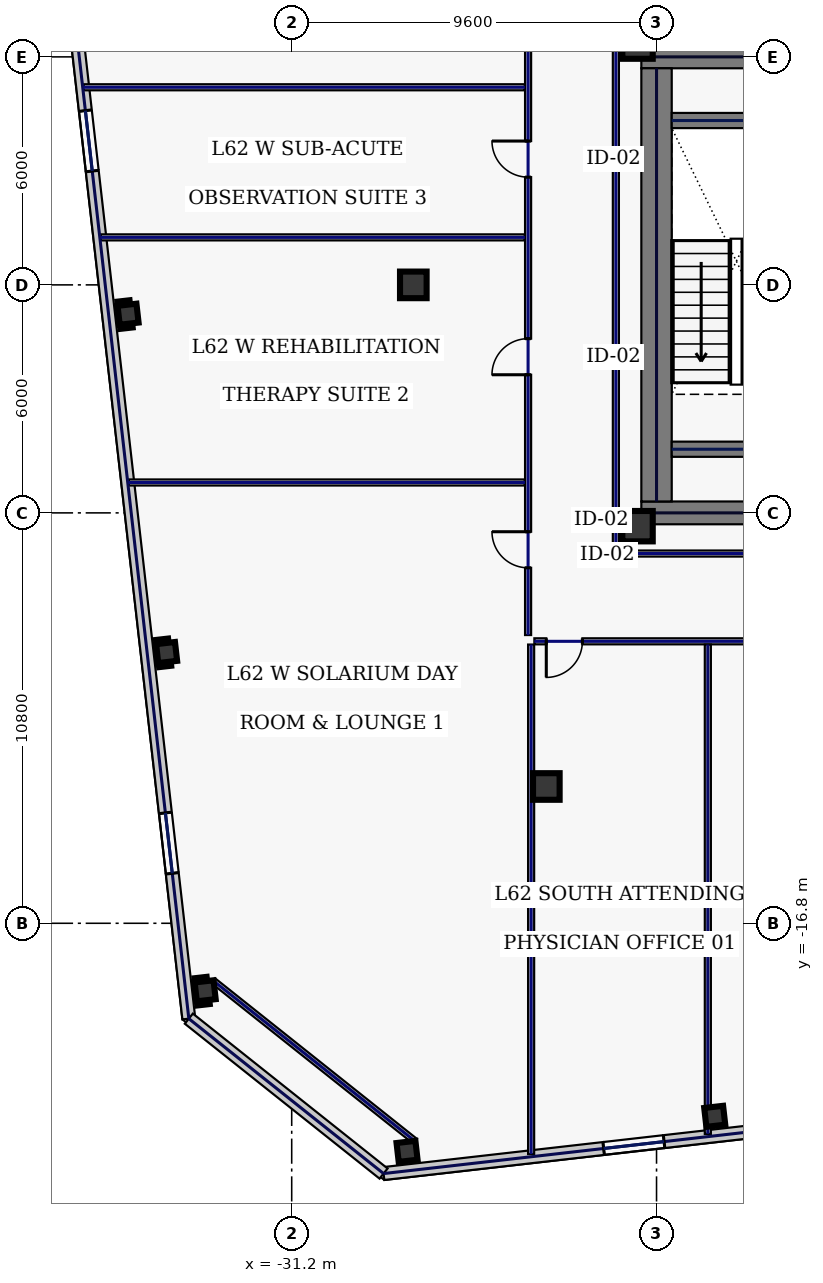
"""IFC4 building model, lengths in metres.
Left out: names, types, materials, properties, quantities, classifications, styles, units other than length and angle.
Written with IfcOpenShell. Run it as: python <this file> out.ifc"""

import sys

from ifc_helpers import new_model, si_unit, direction, frame, frame_2d, origin, origin_2d, place, context, subcontext, project, spatial, rectangle, hollow_rectangle, extrude, element, fill, save


model = new_model("IFC4")
c1 = context("Model", 3, precision=1e-05, world=origin(), true_north=direction((0.0, 1.0)))
c2 = subcontext(c1, "Body", "Model", "MODEL_VIEW")
j1 = project(units=[si_unit("LENGTHUNIT", "METRE"), si_unit("PLANEANGLEUNIT", "RADIAN")], contexts=[c1])
p1 = place(None, origin())
s1 = spatial("IfcSite", under=j1, at=p1, CompositionType="ELEMENT")
p2 = place(p1, origin())
s2 = spatial("IfcBuilding", under=s1, at=p2, CompositionType="ELEMENT")
p3 = place(p2, frame((0.0, 0.0, 267.0)))
s3 = spatial("IfcBuildingStorey", under=s2, at=p3, CompositionType="ELEMENT", Elevation=267.0)
for number, where, z_axis, x_axis in (
    (1, (-22.0, 6.0, 0.0), (0.0, 0.0, 1.0), (1.0, 0.0, 0.0)),
    (2, (-22.0, -6.0, 0.0), (0.0, 0.0, 1.0), (1.0, 0.0, 0.0)),
):
    element("IfcWall", number, at=place(p3, frame(where, z_axis=z_axis, x_axis=x_axis)), inside=s3, PredefinedType="SHEAR", context=c2, shape_type="SweptSolid", body=[
        extrude(rectangle(XDim=11.5, YDim=0.6, at=frame_2d((5.75, 0.0))), origin(), (0.0, 0.0, 1.0), 3.68),
    ])
p4 = place(p3, frame((-21.6, -5.7, 0.0), z_axis=(0.0, 0.0, 1.0), x_axis=(0.0, 1.0, 0.0)))
e3 = element("IfcWall", 3, at=p4, inside=s3, PredefinedType="SHEAR", context=c2, shape_type="SweptSolid", body=[
    extrude(rectangle(XDim=11.4, YDim=0.8, at=frame_2d((5.7, 0.0))), origin(), (0.0, 0.0, 1.0), 3.68),
])
for number, where, z_axis, x_axis in (
    (4, (-21.2, -4.325, 0.0), (0.0, 0.0, 1.0), (1.0, 0.0, 0.0)),
    (5, (-21.2, 4.325, 0.0), (0.0, 0.0, 1.0), (1.0, 0.0, 0.0)),
):
    element("IfcWall", number, at=place(p3, frame(where, z_axis=z_axis, x_axis=x_axis)), inside=s3, PredefinedType="SHEAR", context=c2, shape_type="SweptSolid", body=[
        extrude(rectangle(XDim=3.4, YDim=0.4, at=frame_2d((1.7, 0.0))), origin(), (0.0, 0.0, 1.0), 3.68),
    ])
for number, where, z_axis, x_axis in (
    (6, (-22.1, -6.35, 0.0), (0.0, 0.0, 1.0), (1.0, 0.0, 0.0)),
    (7, (-22.1, 6.35, 0.0), (0.0, 0.0, 1.0), (1.0, 0.0, 0.0)),
):
    element("IfcColumn", number, at=place(p3, frame(where, z_axis=z_axis, x_axis=x_axis)), inside=s3, PredefinedType="COLUMN", context=c2, shape_type="SweptSolid", body=[
        extrude(hollow_rectangle(XDim=0.8, YDim=0.8, WallThickness=0.036, at=origin_2d()), origin(), (0.0, 0.0, 1.0), 3.68),
    ])
for number, where, z_axis, x_axis in (
    (8, (-24.5, -13.2, 0.0), (0.0, 0.0, 1.0), (1.0, 0.0, 0.0)),
    (9, (-28.0, 0.0, 0.0), (0.0, 0.0, 1.0), (1.0, 0.0, 0.0)),
):
    element("IfcColumn", number, at=place(p3, frame(where, z_axis=z_axis, x_axis=x_axis)), inside=s3, PredefinedType="COLUMN", context=c2, shape_type="SweptSolid", body=[
        extrude(hollow_rectangle(XDim=0.7, YDim=0.7, WallThickness=0.032, at=origin_2d()), origin(), (0.0, 0.0, 1.0), 3.68),
    ])
for number, where, z_axis, x_axis in (
    (10, (-28.165, -22.802, 0.0), (0.0, 0.0, 1.0), (0.994, 0.113, 0.0)),
    (11, (-20.069, -21.88, 0.0), (0.0, 0.0, 1.0), (0.994, 0.113, 0.0)),
    (12, (-35.506, -0.772, 0.0), (0.0, 0.0, 1.0), (0.994, 0.113, 0.0)),
    (13, (-34.491, -9.674, 0.0), (0.0, 0.0, 1.0), (0.994, 0.113, 0.0)),
    (14, (-33.477, -18.577, 0.0), (0.0, 0.0, 1.0), (0.994, 0.113, 0.0)),
):
    element("IfcColumn", number, at=place(p3, frame(where, z_axis=z_axis, x_axis=x_axis)), inside=s3, PredefinedType="COLUMN", context=c2, shape_type="SweptSolid", body=[
        extrude(hollow_rectangle(XDim=0.5, YDim=0.5, WallThickness=0.025, at=origin_2d()), origin(), (0.0, 0.0, 1.0), 3.68),
    ])
p5 = place(p3, frame((-28.783, -23.386, 0.0), z_axis=(0.0, 0.0, 1.0), x_axis=(0.993572271362, 0.113199565282, 0.0)))
e15 = element("IfcWall", 15, at=p5, inside=s3, PredefinedType="STANDARD", context=c2, shape_type="SweptSolid", body=[
    extrude(rectangle(XDim=18.651, YDim=0.34, at=frame_2d((9.326, 0.0))), origin(), (0.0, 0.0, 1.0), 3.68),
])
p6 = place(p5, frame((5.829, 0.0, 0.22)))
e16 = element("IfcOpeningElement", 16, at=p6, cuts=e15, PredefinedType="OPENING", context=c2, shape_type="SweptSolid", body=[
    extrude(rectangle(XDim=1.6, YDim=1.2, at=frame_2d((0.8, 0.6))), frame((0.0, 0.18, 0.0), z_axis=(0.0, -1.0, 0.0), x_axis=(1.0, 0.0, 0.0)), (0.0, 0.0, 1.0), 0.36),
])
p7 = place(p5, frame((10.229, 0.0, 0.22)))
e17 = element("IfcOpeningElement", 17, at=p7, cuts=e15, PredefinedType="OPENING", context=c2, shape_type="SweptSolid", body=[
    extrude(rectangle(XDim=1.6, YDim=1.2, at=frame_2d((0.8, 0.6))), frame((0.0, 0.18, 0.0), z_axis=(0.0, -1.0, 0.0), x_axis=(1.0, 0.0, 0.0)), (0.0, 0.0, 1.0), 0.36),
])
p8 = place(p3, frame((-38.118, 17.651, 0.0), z_axis=(0.0, 0.0, 1.0), x_axis=(0.11320360501, -0.9935718111, 0.0)))
e18 = element("IfcWall", 18, at=p8, inside=s3, PredefinedType="STANDARD", context=c2, shape_type="SweptSolid", body=[
    extrude(rectangle(XDim=37.2, YDim=0.34, at=frame_2d((18.6, 0.0))), origin(), (0.0, 0.0, 1.0), 3.68),
])
p9 = place(p8, frame((3.85, 0.0, 0.22)))
e19 = element("IfcOpeningElement", 19, at=p9, cuts=e18, PredefinedType="OPENING", context=c2, shape_type="SweptSolid", body=[
    extrude(rectangle(XDim=1.6, YDim=1.2, at=frame_2d((0.8, 0.6))), frame((0.0, 0.18, 0.0), z_axis=(0.0, -1.0, 0.0), x_axis=(1.0, 0.0, 0.0)), (0.0, 0.0, 1.0), 0.36),
])
p10 = place(p8, frame((13.15, 0.0, 0.22)))
e20 = element("IfcOpeningElement", 20, at=p10, cuts=e18, PredefinedType="OPENING", context=c2, shape_type="SweptSolid", body=[
    extrude(rectangle(XDim=1.6, YDim=1.2, at=frame_2d((0.8, 0.6))), frame((0.0, 0.18, 0.0), z_axis=(0.0, -1.0, 0.0), x_axis=(1.0, 0.0, 0.0)), (0.0, 0.0, 1.0), 0.36),
])
p11 = place(p8, frame((31.75, 0.0, 0.22)))
e21 = element("IfcOpeningElement", 21, at=p11, cuts=e18, PredefinedType="OPENING", context=c2, shape_type="SweptSolid", body=[
    extrude(rectangle(XDim=1.6, YDim=1.2, at=frame_2d((0.8, 0.6))), frame((0.0, 0.18, 0.0), z_axis=(0.0, -1.0, 0.0), x_axis=(1.0, 0.0, 0.0)), (0.0, 0.0, 1.0), 0.36),
])
p12 = place(p3, frame((-33.907, -19.31, 0.0), z_axis=(0.0, 0.0, 1.0), x_axis=(0.782611787794, -0.622510071892, 0.0)))
e22 = element("IfcWall", 22, at=p12, inside=s3, PredefinedType="STANDARD", context=c2, shape_type="SweptSolid", body=[
    extrude(rectangle(XDim=6.548, YDim=0.34, at=frame_2d((3.274, 0.0))), origin(), (0.0, 0.0, 1.0), 3.68),
])
p13 = place(p3, frame((-33.265, -18.311, 0.0), z_axis=(0.0, 0.0, 1.0), x_axis=(0.782602647064, -0.622521563328, 0.0)))
e23 = element("IfcWall", 23, at=p13, inside=s3, PredefinedType="PARTITIONING", context=c2, shape_type="SweptSolid", body=[
    extrude(rectangle(XDim=6.788, YDim=0.16, at=frame_2d((3.394, 0.0))), origin(), (0.0, 0.0, 1.0), 1.475),
])
p14 = place(p3, frame((-24.98, -9.215, 0.0), z_axis=(0.0, 0.0, 1.0), x_axis=(0.0, 1.0, 0.0)))
e24 = element("IfcWall", 24, at=p14, inside=s3, PredefinedType="PARTITIONING", context=c2, shape_type="SweptSolid", body=[
    extrude(rectangle(XDim=18.63, YDim=0.16, at=frame_2d((9.315, 0.0))), origin(), (0.0, 0.0, 1.0), 3.68),
])
p15 = place(p14, frame((1.769, 0.0, 0.0)))
e25 = element("IfcOpeningElement", 25, at=p15, cuts=e24, PredefinedType="OPENING", context=c2, shape_type="SweptSolid", body=[
    extrude(rectangle(XDim=0.95, YDim=2.2, at=frame_2d((0.475, 1.1))), frame((0.0, 0.09, 0.0), z_axis=(0.0, -1.0, 0.0), x_axis=(1.0, 0.0, 0.0)), (0.0, 0.0, 1.0), 0.18),
])
p16 = place(p14, frame((6.85, 0.0, 0.0)))
e26 = element("IfcOpeningElement", 26, at=p16, cuts=e24, PredefinedType="OPENING", context=c2, shape_type="SweptSolid", body=[
    extrude(rectangle(XDim=0.95, YDim=2.2, at=frame_2d((0.475, 1.1))), frame((0.0, 0.09, 0.0), z_axis=(0.0, -1.0, 0.0), x_axis=(1.0, 0.0, 0.0)), (0.0, 0.0, 1.0), 0.18),
])
p17 = place(p14, frame((12.05, 0.0, 0.0)))
e27 = element("IfcOpeningElement", 27, at=p17, cuts=e24, PredefinedType="OPENING", context=c2, shape_type="SweptSolid", body=[
    extrude(rectangle(XDim=0.95, YDim=2.2, at=frame_2d((0.475, 1.1))), frame((0.0, 0.09, 0.0), z_axis=(0.0, -1.0, 0.0), x_axis=(1.0, 0.0, 0.0)), (0.0, 0.0, 1.0), 0.18),
])
p18 = place(p14, frame((16.821, 0.0, 0.0)))
e28 = element("IfcOpeningElement", 28, at=p18, cuts=e24, PredefinedType="OPENING", context=c2, shape_type="SweptSolid", body=[
    extrude(rectangle(XDim=0.95, YDim=2.2, at=frame_2d((0.475, 1.1))), frame((0.0, 0.09, 0.0), z_axis=(0.0, -1.0, 0.0), x_axis=(1.0, 0.0, 0.0)), (0.0, 0.0, 1.0), 0.18),
])
p19 = place(p3, frame((12.535, -9.38, 0.0), z_axis=(0.0, 0.0, 1.0), x_axis=(-1.0, 0.0, 0.0)))
e29 = element("IfcWall", 29, at=p19, inside=s3, PredefinedType="PARTITIONING", context=c2, shape_type="SweptSolid", body=[
    extrude(rectangle(XDim=37.35, YDim=0.16, at=frame_2d((18.675, 0.0))), origin(), (0.0, 0.0, 1.0), 3.68),
])
p20 = place(p19, frame((36.086, 0.0, 0.0)))
e30 = element("IfcOpeningElement", 30, at=p20, cuts=e29, PredefinedType="OPENING", context=c2, shape_type="SweptSolid", body=[
    extrude(rectangle(XDim=0.95, YDim=2.2, at=frame_2d((0.475, 1.1))), frame((0.0, 0.09, 0.0), z_axis=(0.0, -1.0, 0.0), x_axis=(1.0, 0.0, 0.0)), (0.0, 0.0, 1.0), 0.18),
])
p21 = place(p19, frame((29.195, 0.0, 0.0)))
e31 = element("IfcOpeningElement", 31, at=p21, cuts=e29, PredefinedType="OPENING", context=c2, shape_type="SweptSolid", body=[
    extrude(rectangle(XDim=1.3, YDim=2.2, at=frame_2d((0.65, 1.1))), frame((0.0, 0.09, 0.0), z_axis=(0.0, -1.0, 0.0), x_axis=(1.0, 0.0, 0.0)), (0.0, 0.0, 1.0), 0.18),
])
p22 = place(p19, frame((20.525, 0.0, 0.0)))
e32 = element("IfcOpeningElement", 32, at=p22, cuts=e29, PredefinedType="OPENING", context=c2, shape_type="SweptSolid", body=[
    extrude(rectangle(XDim=1.15, YDim=2.2, at=frame_2d((0.575, 1.1))), frame((0.0, 0.09, 0.0), z_axis=(0.0, -1.0, 0.0), x_axis=(1.0, 0.0, 0.0)), (0.0, 0.0, 1.0), 0.18),
])
p23 = place(p19, frame((8.945, 0.0, 0.0)))
e33 = element("IfcOpeningElement", 33, at=p23, cuts=e29, PredefinedType="OPENING", context=c2, shape_type="SweptSolid", body=[
    extrude(rectangle(XDim=1.05, YDim=2.2, at=frame_2d((0.525, 1.1))), frame((0.0, 0.09, 0.0), z_axis=(0.0, -1.0, 0.0), x_axis=(1.0, 0.0, 0.0)), (0.0, 0.0, 1.0), 0.18),
])
p24 = place(p3, frame((-22.67, 7.185, 0.0), z_axis=(0.0, 0.0, 1.0), x_axis=(0.0, -1.0, 0.0)))
e34 = element("IfcWall", 34, at=p24, inside=s3, PredefinedType="PARTITIONING", context=c2, shape_type="SweptSolid", body=[
    extrude(rectangle(XDim=14.17, YDim=0.16, at=frame_2d((7.085, 0.0))), origin(), (0.0, 0.0, 1.0), 3.68),
])
p25 = place(p3, frame((-22.585, -7.07, 0.0), z_axis=(0.0, 0.0, 1.0), x_axis=(1.0, 0.0, 0.0)))
e35 = element("IfcWall", 35, at=p25, inside=s3, PredefinedType="PARTITIONING", context=c2, shape_type="SweptSolid", body=[
    extrude(rectangle(XDim=11.87, YDim=0.16, at=frame_2d((5.935, 0.0))), origin(), (0.0, 0.0, 1.0), 3.68),
])
p26 = place(p3, frame((-24.9, -22.873, 0.0), z_axis=(0.0, 0.0, 1.0), x_axis=(0.0, 1.0, 0.0)))
e36 = element("IfcWall", 36, at=p26, inside=s3, PredefinedType="PARTITIONING", context=c2, shape_type="SweptSolid", body=[
    extrude(rectangle(XDim=13.408, YDim=0.16, at=frame_2d((6.704, 0.0))), origin(), (0.0, 0.0, 1.0), 3.68),
])
p27 = place(p3, frame((-20.25, -22.344, 0.0), z_axis=(0.0, 0.0, 1.0), x_axis=(0.0, 1.0, 0.0)))
e37 = element("IfcWall", 37, at=p27, inside=s3, PredefinedType="PARTITIONING", context=c2, shape_type="SweptSolid", body=[
    extrude(rectangle(XDim=12.878, YDim=0.16, at=frame_2d((6.439, 0.0))), origin(), (0.0, 0.0, 1.0), 1.475),
])
p28 = place(p3, frame((-35.494, -5.2, 0.0), z_axis=(0.0, 0.0, 1.0), x_axis=(1.0, 0.0, 0.0)))
e38 = element("IfcWall", 38, at=p28, inside=s3, PredefinedType="PARTITIONING", context=c2, shape_type="SweptSolid", body=[
    extrude(rectangle(XDim=10.429, YDim=0.16, at=frame_2d((5.215, 0.0))), origin(), (0.0, 0.0, 1.0), 3.68),
])
p29 = place(p3, frame((-36.229, 1.25, 0.0), z_axis=(0.0, 0.0, 1.0), x_axis=(1.0, 0.0, 0.0)))
e39 = element("IfcWall", 39, at=p29, inside=s3, PredefinedType="PARTITIONING", context=c2, shape_type="SweptSolid", body=[
    extrude(rectangle(XDim=11.165, YDim=0.16, at=frame_2d((5.582, 0.0))), origin(), (0.0, 0.0, 1.0), 3.68),
])
p30 = place(p3, frame((-36.679, 5.2, 0.0), z_axis=(0.0, 0.0, 1.0), x_axis=(1.0, 0.0, 0.0)))
e40 = element("IfcWall", 40, at=p30, inside=s3, PredefinedType="PARTITIONING", context=c2, shape_type="SweptSolid", body=[
    extrude(rectangle(XDim=11.615, YDim=0.16, at=frame_2d((5.807, 0.0))), origin(), (0.0, 0.0, 1.0), 3.68),
])
p31 = place(p6, origin())
e41 = element("IfcWindow", 41, at=p31, inside=s3, PartitioningType="SINGLE_PANEL", PredefinedType="WINDOW", context=c2, shape_type="SweptSolid", body=[
    extrude(rectangle(XDim=1.6, YDim=1.2, at=frame_2d((0.8, 0.6))), frame((0.0, 0.03, 0.0), z_axis=(0.0, -1.0, 0.0), x_axis=(1.0, 0.0, 0.0)), (0.0, 0.0, 1.0), 0.06),
])
fill(e16, e41)
p32 = place(p10, origin())
e42 = element("IfcWindow", 42, at=p32, inside=s3, PartitioningType="SINGLE_PANEL", PredefinedType="WINDOW", context=c2, shape_type="SweptSolid", body=[
    extrude(rectangle(XDim=1.6, YDim=1.2, at=frame_2d((0.8, 0.6))), frame((0.0, 0.03, 0.0), z_axis=(0.0, -1.0, 0.0), x_axis=(1.0, 0.0, 0.0)), (0.0, 0.0, 1.0), 0.06),
])
fill(e20, e42)
p33 = place(p11, origin())
e43 = element("IfcWindow", 43, at=p33, inside=s3, PartitioningType="SINGLE_PANEL", PredefinedType="WINDOW", context=c2, shape_type="SweptSolid", body=[
    extrude(rectangle(XDim=1.6, YDim=1.2, at=frame_2d((0.8, 0.6))), frame((0.0, 0.03, 0.0), z_axis=(0.0, -1.0, 0.0), x_axis=(1.0, 0.0, 0.0)), (0.0, 0.0, 1.0), 0.06),
])
fill(e21, e43)
p34 = place(p20, origin())
e44 = element("IfcDoor", 44, at=p34, inside=s3, OperationType="SINGLE_SWING_RIGHT", PredefinedType="DOOR", context=c2, shape_type="SweptSolid", body=[
    extrude(rectangle(XDim=0.95, YDim=2.2, at=frame_2d((0.475, 1.1))), frame((0.0, 0.025, 0.0), z_axis=(0.0, -1.0, 0.0), x_axis=(1.0, 0.0, 0.0)), (0.0, 0.0, 1.0), 0.05),
])
fill(e30, e44)
p35 = place(p15, origin())
e45 = element("IfcDoor", 45, at=p35, inside=s3, OperationType="SINGLE_SWING_RIGHT", PredefinedType="DOOR", context=c2, shape_type="SweptSolid", body=[
    extrude(rectangle(XDim=0.95, YDim=2.2, at=frame_2d((0.475, 1.1))), frame((0.0, 0.025, 0.0), z_axis=(0.0, -1.0, 0.0), x_axis=(1.0, 0.0, 0.0)), (0.0, 0.0, 1.0), 0.05),
])
fill(e25, e45)
p36 = place(p16, origin())
e46 = element("IfcDoor", 46, at=p36, inside=s3, OperationType="SINGLE_SWING_LEFT", PredefinedType="DOOR", context=c2, shape_type="SweptSolid", body=[
    extrude(rectangle(XDim=0.95, YDim=2.2, at=frame_2d((0.475, 1.1))), frame((0.0, 0.025, 0.0), z_axis=(0.0, -1.0, 0.0), x_axis=(1.0, 0.0, 0.0)), (0.0, 0.0, 1.0), 0.05),
])
fill(e26, e46)
p37 = place(p17, origin())
e47 = element("IfcDoor", 47, at=p37, inside=s3, OperationType="SINGLE_SWING_RIGHT", PredefinedType="DOOR", context=c2, shape_type="SweptSolid", body=[
    extrude(rectangle(XDim=0.95, YDim=2.2, at=frame_2d((0.475, 1.1))), frame((0.0, 0.025, 0.0), z_axis=(0.0, -1.0, 0.0), x_axis=(1.0, 0.0, 0.0)), (0.0, 0.0, 1.0), 0.05),
])
fill(e27, e47)
save(model, sys.argv[1])
